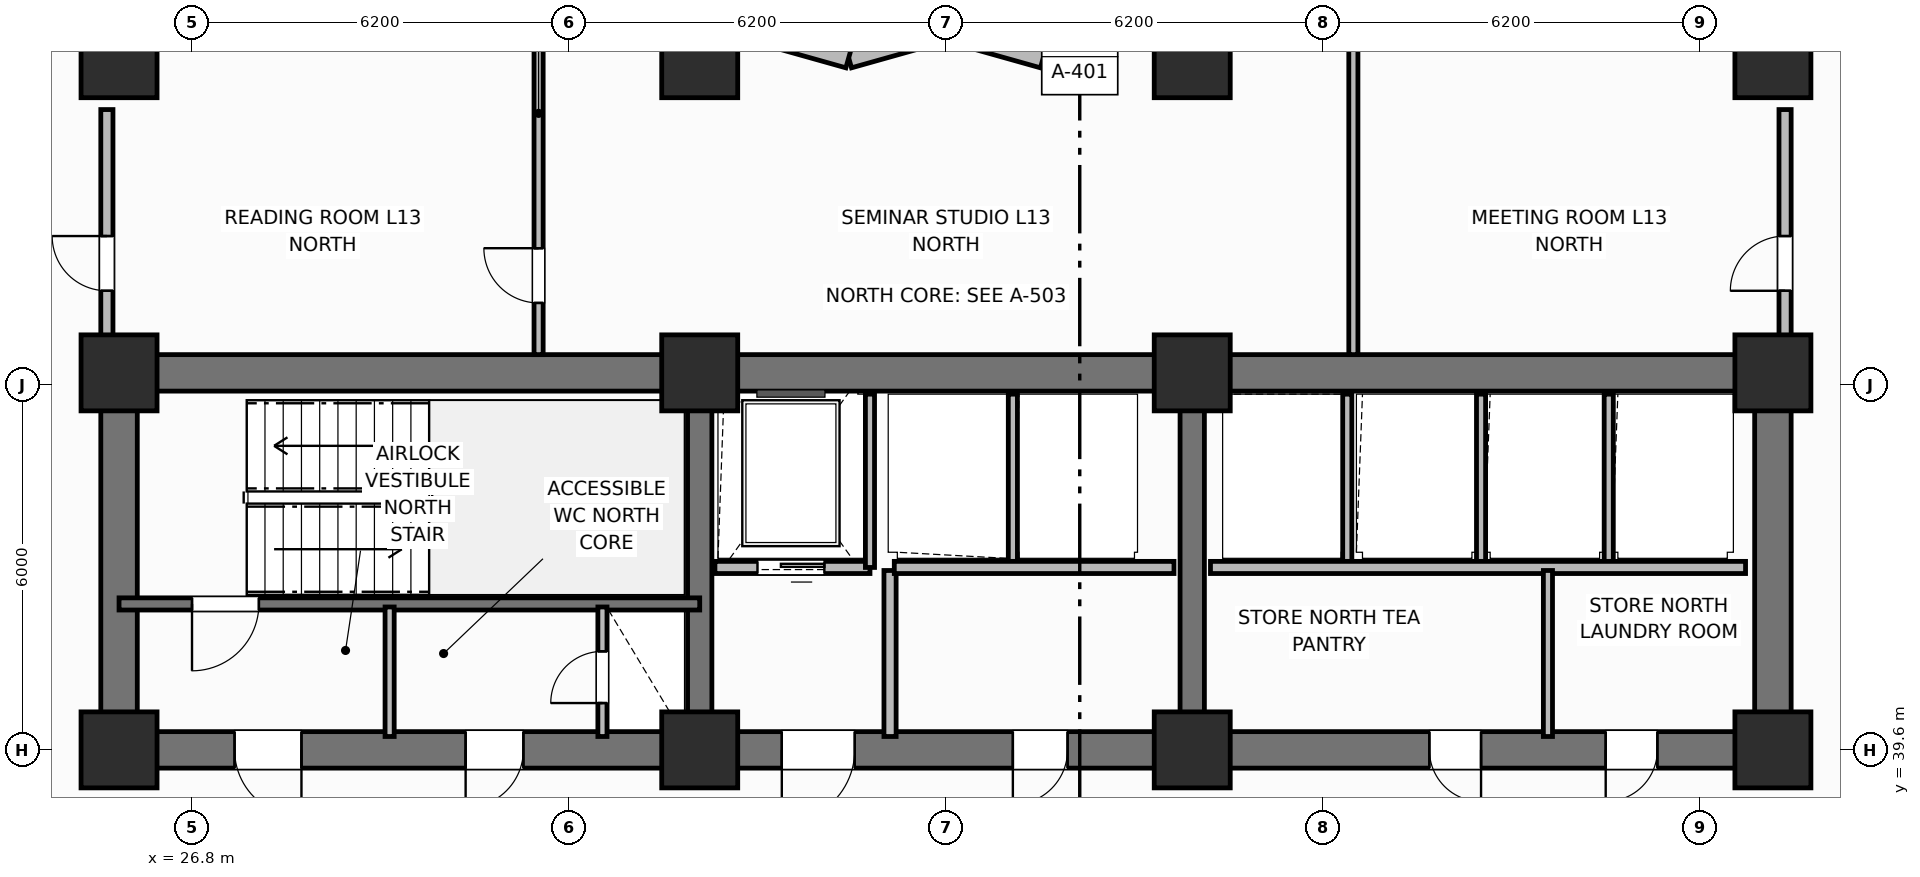
"""IFC4 building model, lengths in metres.
Left out: names, types, materials, properties, quantities, classifications, styles, units other than length and angle.
Written with IfcOpenShell. Run it as: python <this file> out.ifc"""

import sys

from ifc_helpers import new_model, si_unit, direction, frame, frame_2d, origin, origin_2d, place, context, subcontext, project, spatial, rectangle, extrude, element, fill, save


model = new_model("IFC4")
c1 = context("Model", 3, precision=1e-05, world=origin(), true_north=direction((0.0, 1.0)))
c2 = subcontext(c1, "Body", "Model", "MODEL_VIEW")
j1 = project(units=[si_unit("LENGTHUNIT", "METRE"), si_unit("PLANEANGLEUNIT", "RADIAN")], contexts=[c1])
p1 = place(None, origin())
s1 = spatial("IfcSite", under=j1, at=p1, CompositionType="ELEMENT")
p2 = place(p1, origin())
s2 = spatial("IfcBuilding", under=s1, at=p2, CompositionType="ELEMENT")
p3 = place(p2, frame((0.0, 0.0, 54.7)))
s3 = spatial("IfcBuildingStorey", under=s2, at=p3, CompositionType="ELEMENT", Elevation=54.7)
p4 = place(p3, frame((25.6, 45.8, 0.0), z_axis=(0.0, 0.0, 1.0), x_axis=(1.0, 0.0, 0.0)))
e1 = element("IfcWall", 1, at=p4, inside=s3, PredefinedType="SHEAR", context=c2, shape_type="SweptSolid", body=[
    extrude(rectangle(XDim=27.2, YDim=0.6, at=frame_2d((13.6, 0.0))), origin(), (0.0, 0.0, 1.0), 3.7),
])
for number, where, z_axis, x_axis in (
    (2, (25.6, 39.9, 0.0), (0.0, 0.0, 1.0), (0.0, 1.0, 0.0)),
    (3, (52.8, 39.9, 0.0), (0.0, 0.0, 1.0), (0.0, 1.0, 0.0)),
):
    element("IfcWall", number, at=place(p3, frame(where, z_axis=z_axis, x_axis=x_axis)), inside=s3, PredefinedType="SHEAR", context=c2, shape_type="SweptSolid", body=[
        extrude(rectangle(XDim=5.6, YDim=0.6, at=frame_2d((2.8, 0.0))), origin(), (0.0, 0.0, 1.0), 3.7),
    ])
p5 = place(p3, frame((52.8, 39.6, 0.0), z_axis=(0.0, 0.0, 1.0), x_axis=(-1.0, 0.0, 0.0)))
e4 = element("IfcWall", 4, at=p5, inside=s3, PredefinedType="SHEAR", context=c2, shape_type="SweptSolid", body=[
    extrude(rectangle(XDim=27.2, YDim=0.6, at=frame_2d((13.6, 0.0))), origin(), (0.0, 0.0, 1.0), 3.7),
])
p6 = place(p5, frame((24.2, 0.0, 0.0)))
e5 = element("IfcOpeningElement", 5, at=p6, cuts=e4, PredefinedType="OPENING", context=c2, shape_type="SweptSolid", body=[
    extrude(rectangle(XDim=1.1, YDim=2.15, at=frame_2d((0.55, 1.075))), frame((0.0, 0.31, 0.0), z_axis=(0.0, -1.0, 0.0), x_axis=(1.0, 0.0, 0.0)), (0.0, 0.0, 1.0), 0.62),
])
p7 = place(p5, frame((20.55, 0.0, 0.0)))
e6 = element("IfcOpeningElement", 6, at=p7, cuts=e4, PredefinedType="OPENING", context=c2, shape_type="SweptSolid", body=[
    extrude(rectangle(XDim=0.95, YDim=2.1, at=frame_2d((0.475, 1.05))), frame((0.0, 0.31, 0.0), z_axis=(0.0, -1.0, 0.0), x_axis=(1.0, 0.0, 0.0)), (0.0, 0.0, 1.0), 0.62),
])
p8 = place(p5, frame((15.1, 0.0, 0.0)))
e7 = element("IfcOpeningElement", 7, at=p8, cuts=e4, PredefinedType="OPENING", context=c2, shape_type="SweptSolid", body=[
    extrude(rectangle(XDim=1.2, YDim=2.15, at=frame_2d((0.6, 1.075))), frame((0.0, 0.31, 0.0), z_axis=(0.0, -1.0, 0.0), x_axis=(1.0, 0.0, 0.0)), (0.0, 0.0, 1.0), 0.62),
])
p9 = place(p5, frame((11.6, 0.0, 0.0)))
e8 = element("IfcOpeningElement", 8, at=p9, cuts=e4, PredefinedType="OPENING", context=c2, shape_type="SweptSolid", body=[
    extrude(rectangle(XDim=0.9, YDim=2.1, at=frame_2d((0.45, 1.05))), frame((0.0, 0.31, 0.0), z_axis=(0.0, -1.0, 0.0), x_axis=(1.0, 0.0, 0.0)), (0.0, 0.0, 1.0), 0.62),
])
p10 = place(p5, frame((4.8, 0.0, 0.0)))
e9 = element("IfcOpeningElement", 9, at=p10, cuts=e4, PredefinedType="OPENING", context=c2, shape_type="SweptSolid", body=[
    extrude(rectangle(XDim=0.85, YDim=2.1, at=frame_2d((0.425, 1.05))), frame((0.0, 0.31, 0.0), z_axis=(0.0, -1.0, 0.0), x_axis=(1.0, 0.0, 0.0)), (0.0, 0.0, 1.0), 0.62),
])
p11 = place(p5, frame((1.9, 0.0, 0.0)))
e10 = element("IfcOpeningElement", 10, at=p11, cuts=e4, PredefinedType="OPENING", context=c2, shape_type="SweptSolid", body=[
    extrude(rectangle(XDim=0.85, YDim=2.1, at=frame_2d((0.425, 1.05))), frame((0.0, 0.31, 0.0), z_axis=(0.0, -1.0, 0.0), x_axis=(1.0, 0.0, 0.0)), (0.0, 0.0, 1.0), 0.62),
])
for number, where, z_axis, x_axis in (
    (11, (35.15, 39.9, 0.0), (0.0, 0.0, 1.0), (0.0, 1.0, 0.0)),
    (12, (43.25, 39.9, 0.0), (0.0, 0.0, 1.0), (0.0, 1.0, 0.0)),
):
    element("IfcWall", number, at=place(p3, frame(where, z_axis=z_axis, x_axis=x_axis)), inside=s3, PredefinedType="SHEAR", context=c2, shape_type="SweptSolid", body=[
        extrude(rectangle(XDim=5.6, YDim=0.4, at=frame_2d((2.8, 0.0))), origin(), (0.0, 0.0, 1.0), 3.7),
    ])
for number, where, z_axis, x_axis in (
    (13, (25.6, 39.6, 0.0), (0.0, 0.0, 1.0), (1.0, 0.0, 0.0)),
    (14, (25.6, 45.8, 0.0), (0.0, 0.0, 1.0), (1.0, 0.0, 0.0)),
    (15, (35.15, 39.6, 0.0), (0.0, 0.0, 1.0), (1.0, 0.0, 0.0)),
    (16, (35.15, 45.8, 0.0), (0.0, 0.0, 1.0), (1.0, 0.0, 0.0)),
    (17, (43.25, 39.6, 0.0), (0.0, 0.0, 1.0), (1.0, 0.0, 0.0)),
    (18, (43.25, 45.8, 0.0), (0.0, 0.0, 1.0), (1.0, 0.0, 0.0)),
    (19, (52.8, 39.6, 0.0), (0.0, 0.0, 1.0), (1.0, 0.0, 0.0)),
    (20, (52.8, 45.8, 0.0), (0.0, 0.0, 1.0), (1.0, 0.0, 0.0)),
    (21, (25.6, 50.95, 0.0), (0.0, 0.0, 1.0), (1.0, 0.0, 0.0)),
    (22, (35.15, 50.95, 0.0), (0.0, 0.0, 1.0), (1.0, 0.0, 0.0)),
    (23, (43.25, 50.95, 0.0), (0.0, 0.0, 1.0), (1.0, 0.0, 0.0)),
    (24, (52.8, 50.95, 0.0), (0.0, 0.0, 1.0), (1.0, 0.0, 0.0)),
):
    element("IfcColumn", number, at=place(p3, frame(where, z_axis=z_axis, x_axis=x_axis)), inside=s3, PredefinedType="COLUMN", context=c2, shape_type="SweptSolid", body=[
        extrude(rectangle(XDim=1.25, YDim=1.25, at=origin_2d()), origin(), (0.0, 0.0, 1.0), 3.7),
    ])
p12 = place(p3, frame((42.4, 51.43, 0.0), z_axis=(0.0, 0.0, 1.0), x_axis=(-0.962652136636, -0.270741322725, 0.0)))
e25 = element("IfcWall", 25, at=p12, inside=s3, PredefinedType="SOLIDWALL", context=c2, shape_type="SweptSolid", body=[
    extrude(rectangle(XDim=1.662, YDim=0.34, at=frame_2d((0.831, 0.0))), origin(), (0.0, 0.0, 1.0), 2.7),
])
p13 = place(p3, frame((40.8, 50.98, 0.0), z_axis=(0.0, 0.0, 1.0), x_axis=(-0.962662902433, 0.270703040766, 0.0)))
e26 = element("IfcWall", 26, at=p13, inside=s3, PredefinedType="SOLIDWALL", context=c2, shape_type="SweptSolid", body=[
    extrude(rectangle(XDim=1.662, YDim=0.34, at=frame_2d((0.831, 0.0))), origin(), (0.0, 0.0, 1.0), 2.7),
])
p14 = place(p3, frame((39.2, 51.43, 0.0), z_axis=(0.0, 0.0, 1.0), x_axis=(-0.962652136636, -0.270741322725, 0.0)))
e27 = element("IfcWall", 27, at=p14, inside=s3, PredefinedType="SOLIDWALL", context=c2, shape_type="SweptSolid", body=[
    extrude(rectangle(XDim=1.662, YDim=0.34, at=frame_2d((0.831, 0.0))), origin(), (0.0, 0.0, 1.0), 2.7),
])
p15 = place(p3, frame((37.6, 50.98, 0.0), z_axis=(0.0, 0.0, 1.0), x_axis=(-0.962662902433, 0.270703040766, 0.0)))
e28 = element("IfcWall", 28, at=p15, inside=s3, PredefinedType="SOLIDWALL", context=c2, shape_type="SweptSolid", body=[
    extrude(rectangle(XDim=1.662, YDim=0.34, at=frame_2d((0.831, 0.0))), origin(), (0.0, 0.0, 1.0), 2.7),
])
p16 = place(p3, frame((35.15, 42.0, 0.0), z_axis=(0.0, 0.0, 1.0), x_axis=(-1.0, 0.0, 0.0)))
e29 = element("IfcWall", 29, at=p16, inside=s3, PredefinedType="SHEAR", context=c2, shape_type="SweptSolid", body=[
    extrude(rectangle(XDim=9.55, YDim=0.2, at=frame_2d((4.775, 0.0))), origin(), (0.0, 0.0, 1.0), 3.7),
])
p17 = place(p16, frame((7.25, 0.0, 0.0)))
e30 = element("IfcOpeningElement", 30, at=p17, cuts=e29, PredefinedType="OPENING", context=c2, shape_type="SweptSolid", body=[
    extrude(rectangle(XDim=1.1, YDim=2.15, at=frame_2d((0.55, 1.075))), frame((0.0, 0.11, 0.0), z_axis=(0.0, -1.0, 0.0), x_axis=(1.0, 0.0, 0.0)), (0.0, 0.0, 1.0), 0.22),
])
p18 = place(p3, frame((33.55, 39.82, 0.0), z_axis=(0.0, 0.0, 1.0), x_axis=(0.0, 1.0, 0.0)))
e31 = element("IfcWall", 31, at=p18, inside=s3, PredefinedType="PARTITIONING", context=c2, shape_type="SweptSolid", body=[
    extrude(rectangle(XDim=2.13, YDim=0.15, at=frame_2d((1.065, 0.0))), origin(), (0.0, 0.0, 1.0), 2.53),
])
p19 = place(p18, frame((0.55, 0.0, 0.0)))
e32 = element("IfcOpeningElement", 32, at=p19, cuts=e31, PredefinedType="OPENING", context=c2, shape_type="SweptSolid", body=[
    extrude(rectangle(XDim=0.85, YDim=2.05, at=frame_2d((0.425, 1.025))), frame((0.0, 0.085, 0.0), z_axis=(0.0, -1.0, 0.0), x_axis=(1.0, 0.0, 0.0)), (0.0, 0.0, 1.0), 0.17),
])
p20 = place(p3, frame((30.05, 39.82, 0.0), z_axis=(0.0, 0.0, 1.0), x_axis=(0.0, 1.0, 0.0)))
e33 = element("IfcWall", 33, at=p20, inside=s3, PredefinedType="PARTITIONING", context=c2, shape_type="SweptSolid", body=[
    extrude(rectangle(XDim=2.13, YDim=0.15, at=frame_2d((1.065, 0.0))), origin(), (0.0, 0.0, 1.0), 2.53),
])
p21 = place(p3, frame((37.95, 42.6, 0.0), z_axis=(0.0, 0.0, 1.0), x_axis=(-1.0, 0.0, 0.0)))
e34 = element("IfcWall", 34, at=p21, inside=s3, PredefinedType="PARTITIONING", context=c2, shape_type="SweptSolid", body=[
    extrude(rectangle(XDim=2.55, YDim=0.2, at=frame_2d((1.275, 0.0))), origin(), (0.0, 0.0, 1.0), 2.3),
])
p22 = place(p21, frame((0.75, 0.0, 0.0)))
e35 = element("IfcOpeningElement", 35, at=p22, cuts=e34, PredefinedType="OPENING", context=c2, shape_type="SweptSolid", body=[
    extrude(rectangle(XDim=1.1, YDim=2.15, at=frame_2d((0.55, 1.075))), frame((0.0, 0.11, 0.0), z_axis=(0.0, -1.0, 0.0), x_axis=(1.0, 0.0, 0.0)), (0.0, 0.0, 1.0), 0.22),
])
p23 = place(p3, frame((37.95, 42.6, 0.0), z_axis=(0.0, 0.0, 1.0), x_axis=(0.0, 1.0, 0.0)))
e36 = element("IfcWall", 36, at=p23, inside=s3, PredefinedType="PARTITIONING", context=c2, shape_type="SweptSolid", body=[
    extrude(rectangle(XDim=2.85, YDim=0.15, at=frame_2d((1.425, 0.0))), origin(), (0.0, 0.0, 1.0), 2.53),
])
p24 = place(p3, frame((38.28, 39.82, 0.0), z_axis=(0.0, 0.0, 1.0), x_axis=(0.0, 1.0, 0.0)))
e37 = element("IfcWall", 37, at=p24, inside=s3, PredefinedType="PARTITIONING", context=c2, shape_type="SweptSolid", body=[
    extrude(rectangle(XDim=2.73, YDim=0.2, at=frame_2d((1.365, 0.0))), origin(), (0.0, 0.0, 1.0), 2.53),
])
p25 = place(p3, frame((40.3, 42.65, 0.0), z_axis=(0.0, 0.0, 1.0), x_axis=(0.0, 1.0, 0.0)))
e38 = element("IfcWall", 38, at=p25, inside=s3, PredefinedType="PARTITIONING", context=c2, shape_type="SweptSolid", body=[
    extrude(rectangle(XDim=2.8, YDim=0.15, at=frame_2d((1.4, 0.0))), origin(), (0.0, 0.0, 1.0), 2.53),
])
p26 = place(p3, frame((42.95, 42.6, 0.0), z_axis=(0.0, 0.0, 1.0), x_axis=(-1.0, 0.0, 0.0)))
e39 = element("IfcWall", 39, at=p26, inside=s3, PredefinedType="PARTITIONING", context=c2, shape_type="SweptSolid", body=[
    extrude(rectangle(XDim=4.6, YDim=0.2, at=frame_2d((2.3, 0.0))), origin(), (0.0, 0.0, 1.0), 2.3),
])
for number, where, z_axis, x_axis in (
    (40, (45.8, 42.65, 0.0), (0.0, 0.0, 1.0), (0.0, 1.0, 0.0)),
    (41, (48.0, 42.65, 0.0), (0.0, 0.0, 1.0), (0.0, 1.0, 0.0)),
    (42, (50.1, 42.65, 0.0), (0.0, 0.0, 1.0), (0.0, 1.0, 0.0)),
):
    element("IfcWall", number, at=place(p3, frame(where, z_axis=z_axis, x_axis=x_axis)), inside=s3, PredefinedType="PARTITIONING", context=c2, shape_type="SweptSolid", body=[
        extrude(rectangle(XDim=2.8, YDim=0.15, at=frame_2d((1.4, 0.0))), origin(), (0.0, 0.0, 1.0), 2.53),
    ])
p27 = place(p3, frame((52.35, 42.6, 0.0), z_axis=(0.0, 0.0, 1.0), x_axis=(-1.0, 0.0, 0.0)))
e43 = element("IfcWall", 43, at=p27, inside=s3, PredefinedType="PARTITIONING", context=c2, shape_type="SweptSolid", body=[
    extrude(rectangle(XDim=8.8, YDim=0.2, at=frame_2d((4.4, 0.0))), origin(), (0.0, 0.0, 1.0), 2.53),
])
p28 = place(p3, frame((49.1, 39.82, 0.0), z_axis=(0.0, 0.0, 1.0), x_axis=(0.0, 1.0, 0.0)))
e44 = element("IfcWall", 44, at=p28, inside=s3, PredefinedType="PARTITIONING", context=c2, shape_type="SweptSolid", body=[
    extrude(rectangle(XDim=2.73, YDim=0.15, at=frame_2d((1.365, 0.0))), origin(), (0.0, 0.0, 1.0), 2.53),
])
p29 = place(p3, frame((32.5, 46.1, 0.0), z_axis=(0.0, 0.0, 1.0), x_axis=(0.0, 1.0, 0.0)))
e45 = element("IfcWall", 45, at=p29, inside=s3, PredefinedType="PARTITIONING", context=c2, shape_type="SweptSolid", body=[
    extrude(rectangle(XDim=5.33, YDim=0.15, at=frame_2d((2.665, 0.0))), origin(), (0.0, 0.0, 1.0), 2.53),
])
p30 = place(p29, frame((0.85, 0.0, 0.0)))
e46 = element("IfcOpeningElement", 46, at=p30, cuts=e45, PredefinedType="OPENING", context=c2, shape_type="SweptSolid", body=[
    extrude(rectangle(XDim=0.9, YDim=2.1, at=frame_2d((0.45, 1.05))), frame((0.0, 0.085, 0.0), z_axis=(0.0, -1.0, 0.0), x_axis=(1.0, 0.0, 0.0)), (0.0, 0.0, 1.0), 0.17),
])
p31 = place(p3, frame((45.9, 46.1, 0.0), z_axis=(0.0, 0.0, 1.0), x_axis=(0.0, 1.0, 0.0)))
e47 = element("IfcWall", 47, at=p31, inside=s3, PredefinedType="PARTITIONING", context=c2, shape_type="SweptSolid", body=[
    extrude(rectangle(XDim=5.33, YDim=0.15, at=frame_2d((2.665, 0.0))), origin(), (0.0, 0.0, 1.0), 2.53),
])
p32 = place(p3, frame((25.4, 46.1, 0.0), z_axis=(0.0, 0.0, 1.0), x_axis=(0.0, 1.0, 0.0)))
e48 = element("IfcWall", 48, at=p32, inside=s3, PredefinedType="PARTITIONING", context=c2, shape_type="SweptSolid", body=[
    extrude(rectangle(XDim=4.03, YDim=0.2, at=frame_2d((2.015, 0.0))), origin(), (0.0, 0.0, 1.0), 2.53),
])
p33 = place(p32, frame((1.05, 0.0, 0.0)))
e49 = element("IfcOpeningElement", 49, at=p33, cuts=e48, PredefinedType="OPENING", context=c2, shape_type="SweptSolid", body=[
    extrude(rectangle(XDim=0.9, YDim=2.1, at=frame_2d((0.45, 1.05))), frame((0.0, 0.11, 0.0), z_axis=(0.0, -1.0, 0.0), x_axis=(1.0, 0.0, 0.0)), (0.0, 0.0, 1.0), 0.22),
])
p34 = place(p3, frame((53.0, 46.1, 0.0), z_axis=(0.0, 0.0, 1.0), x_axis=(0.0, 1.0, 0.0)))
e50 = element("IfcWall", 50, at=p34, inside=s3, PredefinedType="PARTITIONING", context=c2, shape_type="SweptSolid", body=[
    extrude(rectangle(XDim=4.03, YDim=0.2, at=frame_2d((2.015, 0.0))), origin(), (0.0, 0.0, 1.0), 2.53),
])
p35 = place(p34, frame((1.05, 0.0, 0.0)))
e51 = element("IfcOpeningElement", 51, at=p35, cuts=e50, PredefinedType="OPENING", context=c2, shape_type="SweptSolid", body=[
    extrude(rectangle(XDim=0.9, YDim=2.1, at=frame_2d((0.45, 1.05))), frame((0.0, 0.11, 0.0), z_axis=(0.0, -1.0, 0.0), x_axis=(1.0, 0.0, 0.0)), (0.0, 0.0, 1.0), 0.22),
])
p36 = place(p17, origin())
e52 = element("IfcDoor", 52, at=p36, inside=s3, OperationType="SINGLE_SWING_RIGHT", PredefinedType="DOOR", context=c2, shape_type="SweptSolid", body=[
    extrude(rectangle(XDim=1.1, YDim=2.15, at=frame_2d((0.55, 1.075))), frame((0.0, 0.025, 0.0), z_axis=(0.0, -1.0, 0.0), x_axis=(1.0, 0.0, 0.0)), (0.0, 0.0, 1.0), 0.05),
])
fill(e30, e52)
p37 = place(p19, origin())
e53 = element("IfcDoor", 53, at=p37, inside=s3, OperationType="SINGLE_SWING_LEFT", PredefinedType="TRAPDOOR", context=c2, shape_type="SweptSolid", body=[
    extrude(rectangle(XDim=0.85, YDim=2.05, at=frame_2d((0.425, 1.025))), frame((0.0, 0.025, 0.0), z_axis=(0.0, -1.0, 0.0), x_axis=(1.0, 0.0, 0.0)), (0.0, 0.0, 1.0), 0.05),
])
fill(e32, e53)
p38 = place(p22, origin())
e54 = element("IfcDoor", 54, at=p38, inside=s3, OperationType="SLIDING_TO_LEFT", PredefinedType="DOOR", context=c2, shape_type="SweptSolid", body=[
    extrude(rectangle(XDim=1.1, YDim=2.15, at=frame_2d((0.55, 1.075))), frame((0.0, 0.025, 0.0), z_axis=(0.0, -1.0, 0.0), x_axis=(1.0, 0.0, 0.0)), (0.0, 0.0, 1.0), 0.05),
])
fill(e35, e54)
p39 = place(p30, origin())
e55 = element("IfcDoor", 55, at=p39, inside=s3, OperationType="SINGLE_SWING_RIGHT", PredefinedType="DOOR", context=c2, shape_type="SweptSolid", body=[
    extrude(rectangle(XDim=0.9, YDim=2.1, at=frame_2d((0.45, 1.05))), frame((0.0, 0.025, 0.0), z_axis=(0.0, -1.0, 0.0), x_axis=(1.0, 0.0, 0.0)), (0.0, 0.0, 1.0), 0.05),
])
fill(e46, e55)
p40 = place(p33, origin())
e56 = element("IfcDoor", 56, at=p40, inside=s3, OperationType="SINGLE_SWING_RIGHT", PredefinedType="DOOR", context=c2, shape_type="SweptSolid", body=[
    extrude(rectangle(XDim=0.9, YDim=2.1, at=frame_2d((0.45, 1.05))), frame((0.0, 0.025, 0.0), z_axis=(0.0, -1.0, 0.0), x_axis=(1.0, 0.0, 0.0)), (0.0, 0.0, 1.0), 0.05),
])
fill(e49, e56)
p41 = place(p35, origin())
e57 = element("IfcDoor", 57, at=p41, inside=s3, OperationType="SINGLE_SWING_LEFT", PredefinedType="DOOR", context=c2, shape_type="SweptSolid", body=[
    extrude(rectangle(XDim=0.9, YDim=2.1, at=frame_2d((0.45, 1.05))), frame((0.0, 0.025, 0.0), z_axis=(0.0, -1.0, 0.0), x_axis=(1.0, 0.0, 0.0)), (0.0, 0.0, 1.0), 0.05),
])
fill(e51, e57)
p42 = place(p6, origin())
e58 = element("IfcDoor", 58, at=p42, inside=s3, OperationType="SINGLE_SWING_LEFT", PredefinedType="DOOR", context=c2, shape_type="SweptSolid", body=[
    extrude(rectangle(XDim=1.1, YDim=2.15, at=frame_2d((0.55, 1.075))), frame((0.0, 0.025, 0.0), z_axis=(0.0, -1.0, 0.0), x_axis=(1.0, 0.0, 0.0)), (0.0, 0.0, 1.0), 0.05),
])
fill(e5, e58)
p43 = place(p7, origin())
e59 = element("IfcDoor", 59, at=p43, inside=s3, OperationType="SINGLE_SWING_RIGHT", PredefinedType="DOOR", context=c2, shape_type="SweptSolid", body=[
    extrude(rectangle(XDim=0.95, YDim=2.1, at=frame_2d((0.475, 1.05))), frame((0.0, 0.025, 0.0), z_axis=(0.0, -1.0, 0.0), x_axis=(1.0, 0.0, 0.0)), (0.0, 0.0, 1.0), 0.05),
])
fill(e6, e59)
p44 = place(p8, origin())
e60 = element("IfcDoor", 60, at=p44, inside=s3, OperationType="SINGLE_SWING_RIGHT", PredefinedType="DOOR", context=c2, shape_type="SweptSolid", body=[
    extrude(rectangle(XDim=1.2, YDim=2.15, at=frame_2d((0.6, 1.075))), frame((0.0, 0.025, 0.0), z_axis=(0.0, -1.0, 0.0), x_axis=(1.0, 0.0, 0.0)), (0.0, 0.0, 1.0), 0.05),
])
fill(e7, e60)
p45 = place(p9, origin())
e61 = element("IfcDoor", 61, at=p45, inside=s3, OperationType="SINGLE_SWING_RIGHT", PredefinedType="DOOR", context=c2, shape_type="SweptSolid", body=[
    extrude(rectangle(XDim=0.9, YDim=2.1, at=frame_2d((0.45, 1.05))), frame((0.0, 0.025, 0.0), z_axis=(0.0, -1.0, 0.0), x_axis=(1.0, 0.0, 0.0)), (0.0, 0.0, 1.0), 0.05),
])
fill(e8, e61)
p46 = place(p10, origin())
e62 = element("IfcDoor", 62, at=p46, inside=s3, OperationType="SINGLE_SWING_LEFT", PredefinedType="DOOR", context=c2, shape_type="SweptSolid", body=[
    extrude(rectangle(XDim=0.85, YDim=2.1, at=frame_2d((0.425, 1.05))), frame((0.0, 0.025, 0.0), z_axis=(0.0, -1.0, 0.0), x_axis=(1.0, 0.0, 0.0)), (0.0, 0.0, 1.0), 0.05),
])
fill(e9, e62)
p47 = place(p11, origin())
e63 = element("IfcDoor", 63, at=p47, inside=s3, OperationType="SINGLE_SWING_RIGHT", PredefinedType="DOOR", context=c2, shape_type="SweptSolid", body=[
    extrude(rectangle(XDim=0.85, YDim=2.1, at=frame_2d((0.425, 1.05))), frame((0.0, 0.025, 0.0), z_axis=(0.0, -1.0, 0.0), x_axis=(1.0, 0.0, 0.0)), (0.0, 0.0, 1.0), 0.05),
])
fill(e10, e63)
save(model, sys.argv[1])
